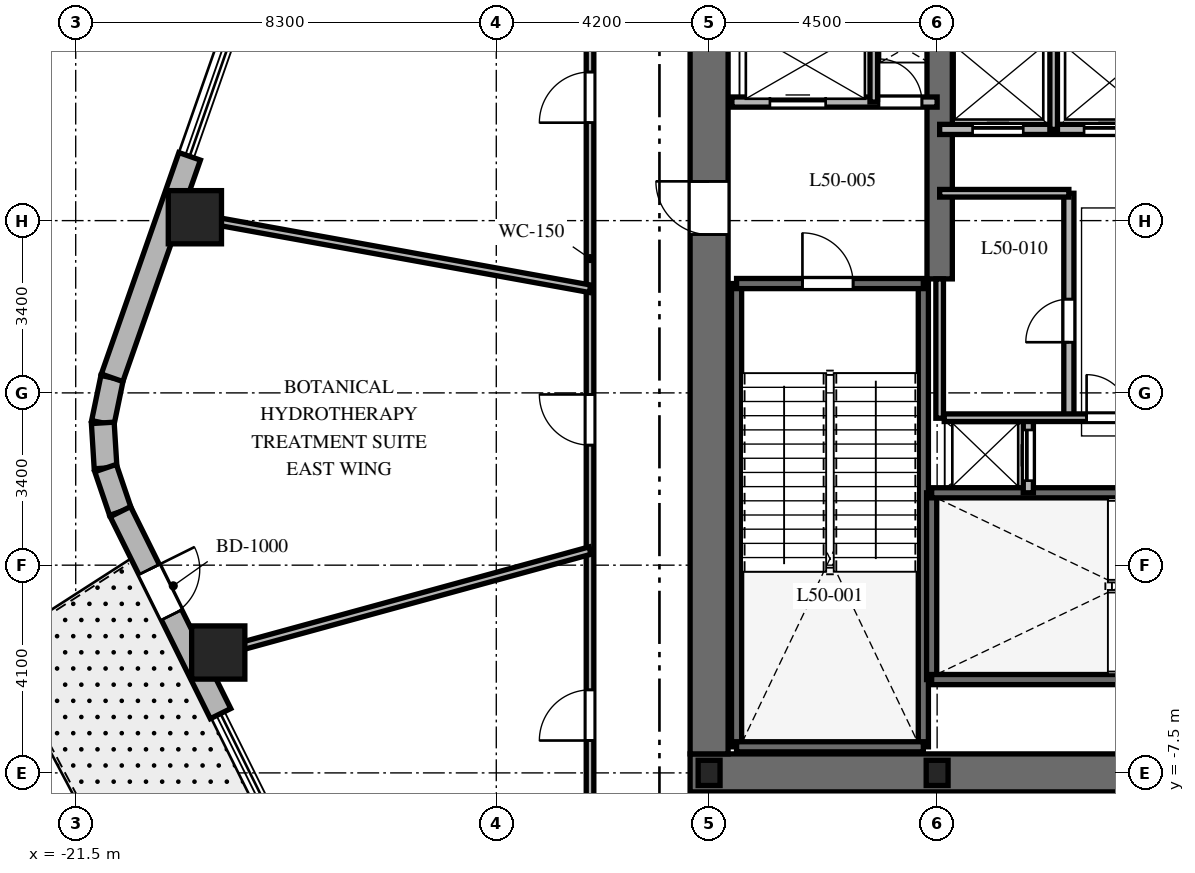
"""IFC4 building model, lengths in metres.
Left out: names, types, materials, properties, quantities, classifications, styles, units other than length and angle.
Written with IfcOpenShell. Run it as: python <this file> out.ifc"""

import sys

from ifc_helpers import new_model, si_unit, direction, frame, frame_2d, origin, origin_2d, place, context, subcontext, project, spatial, rectangle, i_section, extrude, element, fill, save


model = new_model("IFC4")
c1 = context("Model", 3, precision=1e-05, world=origin(), true_north=direction((0.0, 1.0)))
c2 = subcontext(c1, "Body", "Model", "MODEL_VIEW")
j1 = project(units=[si_unit("LENGTHUNIT", "METRE"), si_unit("PLANEANGLEUNIT", "RADIAN")], contexts=[c1])
p1 = place(None, origin())
s1 = spatial("IfcSite", under=j1, at=p1, CompositionType="ELEMENT")
p2 = place(p1, origin())
s2 = spatial("IfcBuilding", under=s1, at=p2, CompositionType="ELEMENT")
p3 = place(p2, frame((0.0, 0.0, 201.5)))
s3 = spatial("IfcBuildingStorey", under=s2, at=p3, CompositionType="ELEMENT", Elevation=201.5)
p4 = place(p3, frame((-9.375, -7.5, 0.0), z_axis=(0.0, 0.0, 1.0), x_axis=(1.0, 0.0, 0.0)))
e1 = element("IfcWall", 1, at=p4, inside=s3, PredefinedType="SHEAR", context=c2, shape_type="SweptSolid", body=[
    extrude(rectangle(XDim=18.75, YDim=0.75, at=frame_2d((9.375, 0.0))), origin(), (0.0, 0.0, 1.0), 5.0),
])
p5 = place(p4, frame((9.425, 0.0, 0.0)))
e2 = element("IfcOpeningElement", 2, at=p5, cuts=e1, PredefinedType="OPENING", context=c2, shape_type="SweptSolid", body=[
    extrude(rectangle(XDim=1.0, YDim=2.15, at=frame_2d((0.5, 1.075))), frame((0.0, 0.385, 0.0), z_axis=(0.0, -1.0, 0.0), x_axis=(1.0, 0.0, 0.0)), (0.0, 0.0, 1.0), 0.77),
])
p6 = place(p3, frame((-9.0, -7.125, 0.0), z_axis=(0.0, 0.0, 1.0), x_axis=(0.0, 1.0, 0.0)))
e3 = element("IfcWall", 3, at=p6, inside=s3, PredefinedType="SHEAR", context=c2, shape_type="SweptSolid", body=[
    extrude(rectangle(XDim=14.25, YDim=0.75, at=frame_2d((7.125, 0.0))), origin(), (0.0, 0.0, 1.0), 5.0),
])
p7 = place(p6, frame((10.25, 0.0, 0.0)))
e4 = element("IfcOpeningElement", 4, at=p7, cuts=e3, PredefinedType="OPENING", context=c2, shape_type="SweptSolid", body=[
    extrude(rectangle(XDim=1.05, YDim=2.15, at=frame_2d((0.525, 1.075))), frame((0.0, 0.385, 0.0), z_axis=(0.0, -1.0, 0.0), x_axis=(1.0, 0.0, 0.0)), (0.0, 0.0, 1.0), 0.77),
])
p8 = place(p3, frame((-4.45, 2.25, 0.0), z_axis=(0.0, 0.0, 1.0), x_axis=(0.0, 1.0, 0.0)))
e5 = element("IfcWall", 5, at=p8, inside=s3, PredefinedType="SHEAR", context=c2, shape_type="SweptSolid", body=[
    extrude(rectangle(XDim=4.875, YDim=0.5, at=frame_2d((2.438, 0.0))), origin(), (0.0, 0.0, 1.0), 5.0),
])
for number, where, z_axis, x_axis in (
    (6, (-8.458, -6.985, 0.0), (0.0, 0.0, 1.0), (0.0, 1.0, 0.0)),
    (7, (-4.772, -6.985, 0.0), (0.0, 0.0, 1.0), (0.0, 1.0, 0.0)),
):
    element("IfcWall", number, at=place(p3, frame(where, z_axis=z_axis, x_axis=x_axis)), inside=s3, PredefinedType="SHEAR", context=c2, shape_type="SweptSolid", body=[
        extrude(rectangle(XDim=9.143, YDim=0.2, at=frame_2d((4.572, 0.0))), origin(), (0.0, 0.0, 1.0), 5.0),
    ])
p9 = place(p3, frame((-8.458, -6.985, 0.0), z_axis=(0.0, 0.0, 1.0), x_axis=(1.0, 0.0, 0.0)))
e8 = element("IfcWall", 8, at=p9, inside=s3, PredefinedType="SHEAR", context=c2, shape_type="SweptSolid", body=[
    extrude(rectangle(XDim=3.686, YDim=0.2, at=frame_2d((1.843, 0.0))), origin(), (0.0, 0.0, 1.0), 5.0),
])
p10 = place(p3, frame((-8.458, 2.158, 0.0), z_axis=(0.0, 0.0, 1.0), x_axis=(1.0, 0.0, 0.0)))
e9 = element("IfcWall", 9, at=p10, inside=s3, PredefinedType="SHEAR", context=c2, shape_type="SweptSolid", body=[
    extrude(rectangle(XDim=3.686, YDim=0.2, at=frame_2d((1.843, 0.0))), origin(), (0.0, 0.0, 1.0), 5.0),
])
p11 = place(p10, frame((1.3, 0.0, 0.0)))
e10 = element("IfcOpeningElement", 10, at=p11, cuts=e9, PredefinedType="OPENING", context=c2, shape_type="SweptSolid", body=[
    extrude(rectangle(XDim=1.0, YDim=2.15, at=frame_2d((0.5, 1.075))), frame((0.0, 0.11, 0.0), z_axis=(0.0, -1.0, 0.0), x_axis=(1.0, 0.0, 0.0)), (0.0, 0.0, 1.0), 0.22),
])
p12 = place(p3, frame((-4.608, -5.658, 0.0), z_axis=(0.0, 0.0, 1.0), x_axis=(0.0, 1.0, 0.0)))
e11 = element("IfcWall", 11, at=p12, inside=s3, PredefinedType="SHEAR", context=c2, shape_type="SweptSolid", body=[
    extrude(rectangle(XDim=3.686, YDim=0.2, at=frame_2d((1.843, 0.0))), origin(), (0.0, 0.0, 1.0), 5.0),
])
p13 = place(p3, frame((-4.608, -5.658, 0.0), z_axis=(0.0, 0.0, 1.0), x_axis=(1.0, 0.0, 0.0)))
e12 = element("IfcWall", 12, at=p13, inside=s3, PredefinedType="SHEAR", context=c2, shape_type="SweptSolid", body=[
    extrude(rectangle(XDim=9.166, YDim=0.2, at=frame_2d((4.583, 0.0))), origin(), (0.0, 0.0, 1.0), 5.0),
])
p14 = place(p13, frame((7.45, 0.0, 0.0)))
e13 = element("IfcOpeningElement", 13, at=p14, cuts=e12, PredefinedType="OPENING", context=c2, shape_type="SweptSolid", body=[
    extrude(rectangle(XDim=1.0, YDim=2.15, at=frame_2d((0.5, 1.075))), frame((0.0, 0.11, 0.0), z_axis=(0.0, -1.0, 0.0), x_axis=(1.0, 0.0, 0.0)), (0.0, 0.0, 1.0), 0.22),
])
p15 = place(p3, frame((-4.608, -1.972, 0.0), z_axis=(0.0, 0.0, 1.0), x_axis=(1.0, 0.0, 0.0)))
e14 = element("IfcWall", 14, at=p15, inside=s3, PredefinedType="SHEAR", context=c2, shape_type="SweptSolid", body=[
    extrude(rectangle(XDim=9.166, YDim=0.2, at=frame_2d((4.583, 0.0))), origin(), (0.0, 0.0, 1.0), 5.0),
])
for number, where, z_axis, x_axis in (
    (15, (-9.0, -7.5, 0.0), (0.0, 0.0, 1.0), (1.0, 0.0, 0.0)),
    (16, (-4.5, -7.5, 0.0), (0.0, 0.0, 1.0), (1.0, 0.0, 0.0)),
):
    element("IfcColumn", number, at=place(p3, frame(where, z_axis=z_axis, x_axis=x_axis)), inside=s3, PredefinedType="COLUMN", context=c2, shape_type="SweptSolid", body=[
        extrude(i_section(OverallWidth=0.432, OverallDepth=0.498, WebThickness=0.056, FlangeThickness=0.089, at=origin_2d()), origin(), (0.0, 0.0, 1.0), 5.0),
    ])
for number, where, z_axis, x_axis in (
    (17, (-19.148, 3.467, 0.0), (0.0, 0.0, 1.0), (1.0, 0.0, 0.0)),
    (18, (-18.687, -5.124, 0.0), (0.0, 0.0, 1.0), (1.0, 0.0, 0.0)),
):
    element("IfcColumn", number, at=place(p3, frame(where, z_axis=z_axis, x_axis=x_axis)), inside=s3, PredefinedType="COLUMN", context=c2, shape_type="SweptSolid", body=[
        extrude(rectangle(XDim=1.05, YDim=1.05, at=origin_2d()), origin(), (0.0, 0.0, 1.0), 5.0),
    ])
p16 = place(p3, frame((-20.782, 0.298, 0.0), z_axis=(0.0, 0.0, 1.0), x_axis=(-0.202570068411, -0.979267771033, 0.0)))
e19 = element("IfcWall", 19, at=p16, inside=s3, PredefinedType="SOLIDWALL", context=c2, shape_type="SweptSolid", body=[
    extrude(rectangle(XDim=0.909, YDim=0.45, at=frame_2d((0.454, 0.0))), origin(), (0.0, 0.0, 1.0), 4.7),
])
p17 = place(p3, frame((-20.966, -0.592, 0.0), z_axis=(0.0, 0.0, 1.0), x_axis=(0.061748898935, -0.998091715966, 0.0)))
e20 = element("IfcWall", 20, at=p17, inside=s3, PredefinedType="SOLIDWALL", context=c2, shape_type="SweptSolid", body=[
    extrude(rectangle(XDim=0.894, YDim=0.45, at=frame_2d((0.447, 0.0))), origin(), (0.0, 0.0, 1.0), 4.7),
])
p18 = place(p3, frame((-20.911, -1.484, 0.0), z_axis=(0.0, 0.0, 1.0), x_axis=(0.321623334353, -0.946867694453, 0.0)))
e21 = element("IfcWall", 21, at=p18, inside=s3, PredefinedType="SOLIDWALL", context=c2, shape_type="SweptSolid", body=[
    extrude(rectangle(XDim=0.909, YDim=0.45, at=frame_2d((0.454, 0.0))), origin(), (0.0, 0.0, 1.0), 4.7),
])
p19 = place(p3, frame((-19.252, 4.669, 0.0), z_axis=(0.0, 0.0, 1.0), x_axis=(-0.330411483424, -0.943836983606, 0.0)))
e22 = element("IfcWall", 22, at=p19, inside=s3, PredefinedType="SOLIDWALL", context=c2, shape_type="SweptSolid", body=[
    extrude(rectangle(XDim=4.631, YDim=0.45, at=frame_2d((2.315, 0.0))), origin(), (0.0, 0.0, 1.0), 4.7),
])
p20 = place(p3, frame((-20.618, -2.344, 0.0), z_axis=(0.0, 0.0, 1.0), x_axis=(0.444248024627, -0.895903841166, 0.0)))
e23 = element("IfcWall", 23, at=p20, inside=s3, PredefinedType="SOLIDWALL", context=c2, shape_type="SweptSolid", body=[
    extrude(rectangle(XDim=4.449, YDim=0.45, at=frame_2d((2.225, 0.0))), origin(), (0.0, 0.0, 1.0), 4.7),
])
p21 = place(p20, frame((1.275, 0.0, 0.0)))
e24 = element("IfcOpeningElement", 24, at=p21, cuts=e23, PredefinedType="OPENING", context=c2, shape_type="SweptSolid", body=[
    extrude(rectangle(XDim=1.0, YDim=2.15, at=frame_2d((0.5, 1.075))), frame((0.0, 0.235, 0.0), z_axis=(0.0, -1.0, 0.0), x_axis=(1.0, 0.0, 0.0)), (0.0, 0.0, 1.0), 0.47),
])
p22 = place(p3, frame((-8.55, 5.74, 0.0), z_axis=(0.0, 0.0, 1.0), x_axis=(1.0, 0.0, 0.0)))
e25 = element("IfcWall", 25, at=p22, inside=s3, PredefinedType="PARTITIONING", context=c2, shape_type="SweptSolid", body=[
    extrude(rectangle(XDim=4.05, YDim=0.2, at=frame_2d((2.025, 0.0))), origin(), (0.0, 0.0, 1.0), 4.7),
])
p23 = place(p22, frame((0.75, 0.0, 0.0)))
e26 = element("IfcOpeningElement", 26, at=p23, cuts=e25, PredefinedType="OPENING", context=c2, shape_type="SweptSolid", body=[
    extrude(rectangle(XDim=1.1, YDim=2.2, at=frame_2d((0.55, 1.1))), frame((0.0, 0.11, 0.0), z_axis=(0.0, -1.0, 0.0), x_axis=(1.0, 0.0, 0.0)), (0.0, 0.0, 1.0), 0.22),
])
p24 = place(p22, frame((2.9, 0.0, 0.0)))
e27 = element("IfcOpeningElement", 27, at=p24, cuts=e25, PredefinedType="OPENING", context=c2, shape_type="SweptSolid", body=[
    extrude(rectangle(XDim=0.85, YDim=2.03, at=frame_2d((0.425, 1.015))), frame((0.0, 0.11, 0.0), z_axis=(0.0, -1.0, 0.0), x_axis=(1.0, 0.0, 0.0)), (0.0, 0.0, 1.0), 0.22),
])
p25 = place(p3, frame((-5.75, 5.74, 0.0), z_axis=(0.0, 0.0, 1.0), x_axis=(0.0, 1.0, 0.0)))
e28 = element("IfcWall", 28, at=p25, inside=s3, PredefinedType="PARTITIONING", context=c2, shape_type="SweptSolid", body=[
    extrude(rectangle(XDim=1.41, YDim=0.15, at=frame_2d((0.705, 0.0))), origin(), (0.0, 0.0, 1.0), 4.7),
])
p26 = place(p3, frame((-2.7, -1.972, 0.0), z_axis=(0.0, 0.0, 1.0), x_axis=(0.0, 1.0, 0.0)))
e29 = element("IfcWall", 29, at=p26, inside=s3, PredefinedType="PARTITIONING", context=c2, shape_type="SweptSolid", body=[
    extrude(rectangle(XDim=1.472, YDim=0.2, at=frame_2d((0.736, 0.0))), origin(), (0.0, 0.0, 1.0), 4.7),
])
p27 = place(p26, frame((0.24, 0.0, 0.0)))
e30 = element("IfcOpeningElement", 30, at=p27, cuts=e29, PredefinedType="OPENING", context=c2, shape_type="SweptSolid", body=[
    extrude(rectangle(XDim=1.0, YDim=2.2, at=frame_2d((0.5, 1.1))), frame((0.0, 0.11, 0.0), z_axis=(0.0, -1.0, 0.0), x_axis=(1.0, 0.0, 0.0)), (0.0, 0.0, 1.0), 0.22),
])
p28 = place(p3, frame((-4.45, 5.2, 0.0), z_axis=(0.0, 0.0, 1.0), x_axis=(1.0, 0.0, 0.0)))
e31 = element("IfcWall", 31, at=p28, inside=s3, PredefinedType="PARTITIONING", context=c2, shape_type="SweptSolid", body=[
    extrude(rectangle(XDim=4.5, YDim=0.2, at=frame_2d((2.25, 0.0))), origin(), (0.0, 0.0, 1.0), 4.7),
])
p29 = place(p28, frame((0.65, 0.0, 0.0)))
e32 = element("IfcOpeningElement", 32, at=p29, cuts=e31, PredefinedType="OPENING", context=c2, shape_type="SweptSolid", body=[
    extrude(rectangle(XDim=1.0, YDim=2.2, at=frame_2d((0.5, 1.1))), frame((0.0, 0.11, 0.0), z_axis=(0.0, -1.0, 0.0), x_axis=(1.0, 0.0, 0.0)), (0.0, 0.0, 1.0), 0.22),
])
p30 = place(p28, frame((2.85, 0.0, 0.0)))
e33 = element("IfcOpeningElement", 33, at=p30, cuts=e31, PredefinedType="OPENING", context=c2, shape_type="SweptSolid", body=[
    extrude(rectangle(XDim=1.0, YDim=2.2, at=frame_2d((0.5, 1.1))), frame((0.0, 0.11, 0.0), z_axis=(0.0, -1.0, 0.0), x_axis=(1.0, 0.0, 0.0)), (0.0, 0.0, 1.0), 0.22),
])
p31 = place(p3, frame((-2.2, 5.2, 0.0), z_axis=(0.0, 0.0, 1.0), x_axis=(0.0, 1.0, 0.0)))
e34 = element("IfcWall", 34, at=p31, inside=s3, PredefinedType="PARTITIONING", context=c2, shape_type="SweptSolid", body=[
    extrude(rectangle(XDim=1.85, YDim=0.15, at=frame_2d((0.925, 0.0))), origin(), (0.0, 0.0, 1.0), 4.7),
])
p32 = place(p3, frame((-4.45, -0.5, 0.0), z_axis=(0.0, 0.0, 1.0), x_axis=(0.0, 1.0, 0.0)))
e35 = element("IfcWall", 35, at=p32, inside=s3, PredefinedType="PARTITIONING", context=c2, shape_type="SweptSolid", body=[
    extrude(rectangle(XDim=2.75, YDim=0.15, at=frame_2d((1.375, 0.0))), origin(), (0.0, 0.0, 1.0), 4.7),
])
p33 = place(p3, frame((-1.9, -0.5, 0.0), z_axis=(0.0, 0.0, 1.0), x_axis=(0.0, 1.0, 0.0)))
e36 = element("IfcWall", 36, at=p33, inside=s3, PredefinedType="PARTITIONING", context=c2, shape_type="SweptSolid", body=[
    extrude(rectangle(XDim=4.44, YDim=0.2, at=frame_2d((2.22, 0.0))), origin(), (0.0, 0.0, 1.0), 4.7),
])
p34 = place(p33, frame((1.5, 0.0, 0.0)))
e37 = element("IfcOpeningElement", 37, at=p34, cuts=e36, PredefinedType="OPENING", context=c2, shape_type="SweptSolid", body=[
    extrude(rectangle(XDim=0.85, YDim=2.03, at=frame_2d((0.425, 1.015))), frame((0.0, 0.11, 0.0), z_axis=(0.0, -1.0, 0.0), x_axis=(1.0, 0.0, 0.0)), (0.0, 0.0, 1.0), 0.22),
])
p35 = place(p3, frame((-4.45, 3.94, 0.0), z_axis=(0.0, 0.0, 1.0), x_axis=(1.0, 0.0, 0.0)))
e38 = element("IfcWall", 38, at=p35, inside=s3, PredefinedType="PARTITIONING", context=c2, shape_type="SweptSolid", body=[
    extrude(rectangle(XDim=2.55, YDim=0.15, at=frame_2d((1.275, 0.0))), origin(), (0.0, 0.0, 1.0), 4.7),
])
p36 = place(p3, frame((-4.36, -0.49, 0.0), z_axis=(0.0, 0.0, 1.0), x_axis=(1.0, 0.0, 0.0)))
e39 = element("IfcWall", 39, at=p36, inside=s3, PredefinedType="PARTITIONING", context=c2, shape_type="SweptSolid", body=[
    extrude(rectangle(XDim=8.72, YDim=0.15, at=frame_2d((4.36, 0.0))), origin(), (0.0, 0.0, 1.0), 4.7),
])
p37 = place(p36, frame((2.81, 0.0, 0.0)))
e40 = element("IfcOpeningElement", 40, at=p37, cuts=e39, PredefinedType="OPENING", context=c2, shape_type="SweptSolid", body=[
    extrude(rectangle(XDim=0.85, YDim=2.03, at=frame_2d((0.425, 1.015))), frame((0.0, 0.085, 0.0), z_axis=(0.0, -1.0, 0.0), x_axis=(1.0, 0.0, 0.0)), (0.0, 0.0, 1.0), 0.17),
])
p38 = place(p36, frame((4.61, 0.0, 0.0)))
e41 = element("IfcOpeningElement", 41, at=p38, cuts=e39, PredefinedType="OPENING", context=c2, shape_type="SweptSolid", body=[
    extrude(rectangle(XDim=0.85, YDim=2.03, at=frame_2d((0.425, 1.015))), frame((0.0, 0.085, 0.0), z_axis=(0.0, -1.0, 0.0), x_axis=(1.0, 0.0, 0.0)), (0.0, 0.0, 1.0), 0.17),
])
p39 = place(p3, frame((-11.35, -9.85, 0.0), z_axis=(0.0, 0.0, 1.0), x_axis=(0.0, 1.0, 0.0)))
e42 = element("IfcWall", 42, at=p39, inside=s3, PredefinedType="PARTITIONING", context=c2, shape_type="SweptSolid", body=[
    extrude(rectangle(XDim=19.7, YDim=0.15, at=frame_2d((9.85, 0.0))), origin(), (0.0, 0.0, 1.0), 2.89),
])
p40 = place(p39, frame((15.183, 0.0, 0.0)))
e43 = element("IfcOpeningElement", 43, at=p40, cuts=e42, PredefinedType="OPENING", context=c2, shape_type="SweptSolid", body=[
    extrude(rectangle(XDim=1.0, YDim=2.03, at=frame_2d((0.5, 1.015))), frame((0.0, 0.085, 0.0), z_axis=(0.0, -1.0, 0.0), x_axis=(1.0, 0.0, 0.0)), (0.0, 0.0, 1.0), 0.17),
])
p41 = place(p39, frame((8.819, 0.0, 0.0)))
e44 = element("IfcOpeningElement", 44, at=p41, cuts=e42, PredefinedType="OPENING", context=c2, shape_type="SweptSolid", body=[
    extrude(rectangle(XDim=1.0, YDim=2.03, at=frame_2d((0.5, 1.015))), frame((0.0, 0.085, 0.0), z_axis=(0.0, -1.0, 0.0), x_axis=(1.0, 0.0, 0.0)), (0.0, 0.0, 1.0), 0.17),
])
p42 = place(p39, frame((2.989, 0.0, 0.0)))
e45 = element("IfcOpeningElement", 45, at=p42, cuts=e42, PredefinedType="OPENING", context=c2, shape_type="SweptSolid", body=[
    extrude(rectangle(XDim=1.0, YDim=2.03, at=frame_2d((0.5, 1.015))), frame((0.0, 0.085, 0.0), z_axis=(0.0, -1.0, 0.0), x_axis=(1.0, 0.0, 0.0)), (0.0, 0.0, 1.0), 0.17),
])
p43 = place(p3, frame((-11.35, 2.055, 0.0), z_axis=(0.0, 0.0, 1.0), x_axis=(-0.983999921986, 0.178168890468, 0.0)))
e46 = element("IfcWall", 46, at=p43, inside=s3, PredefinedType="PARTITIONING", context=c2, shape_type="SweptSolid", body=[
    extrude(rectangle(XDim=8.426, YDim=0.15, at=frame_2d((4.213, 0.0))), origin(), (0.0, 0.0, 1.0), 2.89),
])
p44 = place(p3, frame((-11.35, -3.112, 0.0), z_axis=(0.0, 0.0, 1.0), x_axis=(-0.964400374182, -0.264446437445, 0.0)))
e47 = element("IfcWall", 47, at=p44, inside=s3, PredefinedType="PARTITIONING", context=c2, shape_type="SweptSolid", body=[
    extrude(rectangle(XDim=8.112, YDim=0.15, at=frame_2d((4.056, 0.0))), origin(), (0.0, 0.0, 1.0), 2.89),
])
p45 = place(p21, origin())
e48 = element("IfcDoor", 48, at=p45, inside=s3, OperationType="SINGLE_SWING_LEFT", PredefinedType="DOOR", context=c2, shape_type="SweptSolid", body=[
    extrude(rectangle(XDim=1.0, YDim=2.15, at=frame_2d((0.5, 1.075))), frame((0.0, 0.025, 0.0), z_axis=(0.0, -1.0, 0.0), x_axis=(1.0, 0.0, 0.0)), (0.0, 0.0, 1.0), 0.05),
])
fill(e24, e48)
p46 = place(p11, origin())
e49 = element("IfcDoor", 49, at=p46, inside=s3, OperationType="SINGLE_SWING_LEFT", PredefinedType="DOOR", context=c2, shape_type="SweptSolid", body=[
    extrude(rectangle(XDim=1.0, YDim=2.15, at=frame_2d((0.5, 1.075))), frame((0.0, 0.025, 0.0), z_axis=(0.0, -1.0, 0.0), x_axis=(1.0, 0.0, 0.0)), (0.0, 0.0, 1.0), 0.05),
])
fill(e10, e49)
p47 = place(p7, origin())
e50 = element("IfcDoor", 50, at=p47, inside=s3, OperationType="SINGLE_SWING_RIGHT", PredefinedType="DOOR", context=c2, shape_type="SweptSolid", body=[
    extrude(rectangle(XDim=1.05, YDim=2.15, at=frame_2d((0.525, 1.075))), frame((0.0, 0.025, 0.0), z_axis=(0.0, -1.0, 0.0), x_axis=(1.0, 0.0, 0.0)), (0.0, 0.0, 1.0), 0.05),
])
fill(e4, e50)
p48 = place(p23, origin())
e51 = element("IfcDoor", 51, at=p48, inside=s3, OperationType="SLIDING_TO_LEFT", PredefinedType="DOOR", context=c2, shape_type="SweptSolid", body=[
    extrude(rectangle(XDim=1.1, YDim=2.2, at=frame_2d((0.55, 1.1))), frame((0.0, 0.025, 0.0), z_axis=(0.0, -1.0, 0.0), x_axis=(1.0, 0.0, 0.0)), (0.0, 0.0, 1.0), 0.05),
])
fill(e26, e51)
p49 = place(p24, origin())
e52 = element("IfcDoor", 52, at=p49, inside=s3, OperationType="SINGLE_SWING_LEFT", PredefinedType="DOOR", context=c2, shape_type="SweptSolid", body=[
    extrude(rectangle(XDim=0.85, YDim=2.03, at=frame_2d((0.425, 1.015))), frame((0.0, 0.025, 0.0), z_axis=(0.0, -1.0, 0.0), x_axis=(1.0, 0.0, 0.0)), (0.0, 0.0, 1.0), 0.05),
])
fill(e27, e52)
p50 = place(p27, origin())
e53 = element("IfcDoor", 53, at=p50, inside=s3, OperationType="SLIDING_TO_LEFT", PredefinedType="DOOR", context=c2, shape_type="SweptSolid", body=[
    extrude(rectangle(XDim=1.0, YDim=2.2, at=frame_2d((0.5, 1.1))), frame((0.0, 0.025, 0.0), z_axis=(0.0, -1.0, 0.0), x_axis=(1.0, 0.0, 0.0)), (0.0, 0.0, 1.0), 0.05),
])
fill(e30, e53)
p51 = place(p29, origin())
e54 = element("IfcDoor", 54, at=p51, inside=s3, OperationType="SLIDING_TO_LEFT", PredefinedType="DOOR", context=c2, shape_type="SweptSolid", body=[
    extrude(rectangle(XDim=1.0, YDim=2.2, at=frame_2d((0.5, 1.1))), frame((0.0, 0.025, 0.0), z_axis=(0.0, -1.0, 0.0), x_axis=(1.0, 0.0, 0.0)), (0.0, 0.0, 1.0), 0.05),
])
fill(e32, e54)
p52 = place(p30, origin())
e55 = element("IfcDoor", 55, at=p52, inside=s3, OperationType="SLIDING_TO_RIGHT", PredefinedType="DOOR", context=c2, shape_type="SweptSolid", body=[
    extrude(rectangle(XDim=1.0, YDim=2.2, at=frame_2d((0.5, 1.1))), frame((0.0, 0.025, 0.0), z_axis=(0.0, -1.0, 0.0), x_axis=(1.0, 0.0, 0.0)), (0.0, 0.0, 1.0), 0.05),
])
fill(e33, e55)
p53 = place(p34, origin())
e56 = element("IfcDoor", 56, at=p53, inside=s3, OperationType="SINGLE_SWING_LEFT", PredefinedType="DOOR", context=c2, shape_type="SweptSolid", body=[
    extrude(rectangle(XDim=0.85, YDim=2.03, at=frame_2d((0.425, 1.015))), frame((0.0, 0.025, 0.0), z_axis=(0.0, -1.0, 0.0), x_axis=(1.0, 0.0, 0.0)), (0.0, 0.0, 1.0), 0.05),
])
fill(e37, e56)
p54 = place(p37, origin())
e57 = element("IfcDoor", 57, at=p54, inside=s3, OperationType="SINGLE_SWING_LEFT", PredefinedType="DOOR", context=c2, shape_type="SweptSolid", body=[
    extrude(rectangle(XDim=0.85, YDim=2.03, at=frame_2d((0.425, 1.015))), frame((0.0, 0.025, 0.0), z_axis=(0.0, -1.0, 0.0), x_axis=(1.0, 0.0, 0.0)), (0.0, 0.0, 1.0), 0.05),
])
fill(e40, e57)
p55 = place(p40, origin())
e58 = element("IfcDoor", 58, at=p55, inside=s3, OperationType="SINGLE_SWING_LEFT", PredefinedType="DOOR", context=c2, shape_type="SweptSolid", body=[
    extrude(rectangle(XDim=1.0, YDim=2.03, at=frame_2d((0.5, 1.015))), frame((0.0, 0.025, 0.0), z_axis=(0.0, -1.0, 0.0), x_axis=(1.0, 0.0, 0.0)), (0.0, 0.0, 1.0), 0.05),
])
fill(e43, e58)
p56 = place(p41, origin())
e59 = element("IfcDoor", 59, at=p56, inside=s3, OperationType="SINGLE_SWING_RIGHT", PredefinedType="DOOR", context=c2, shape_type="SweptSolid", body=[
    extrude(rectangle(XDim=1.0, YDim=2.03, at=frame_2d((0.5, 1.015))), frame((0.0, 0.025, 0.0), z_axis=(0.0, -1.0, 0.0), x_axis=(1.0, 0.0, 0.0)), (0.0, 0.0, 1.0), 0.05),
])
fill(e44, e59)
p57 = place(p42, origin())
e60 = element("IfcDoor", 60, at=p57, inside=s3, OperationType="SINGLE_SWING_LEFT", PredefinedType="DOOR", context=c2, shape_type="SweptSolid", body=[
    extrude(rectangle(XDim=1.0, YDim=2.03, at=frame_2d((0.5, 1.015))), frame((0.0, 0.025, 0.0), z_axis=(0.0, -1.0, 0.0), x_axis=(1.0, 0.0, 0.0)), (0.0, 0.0, 1.0), 0.05),
])
fill(e45, e60)
save(model, sys.argv[1])
